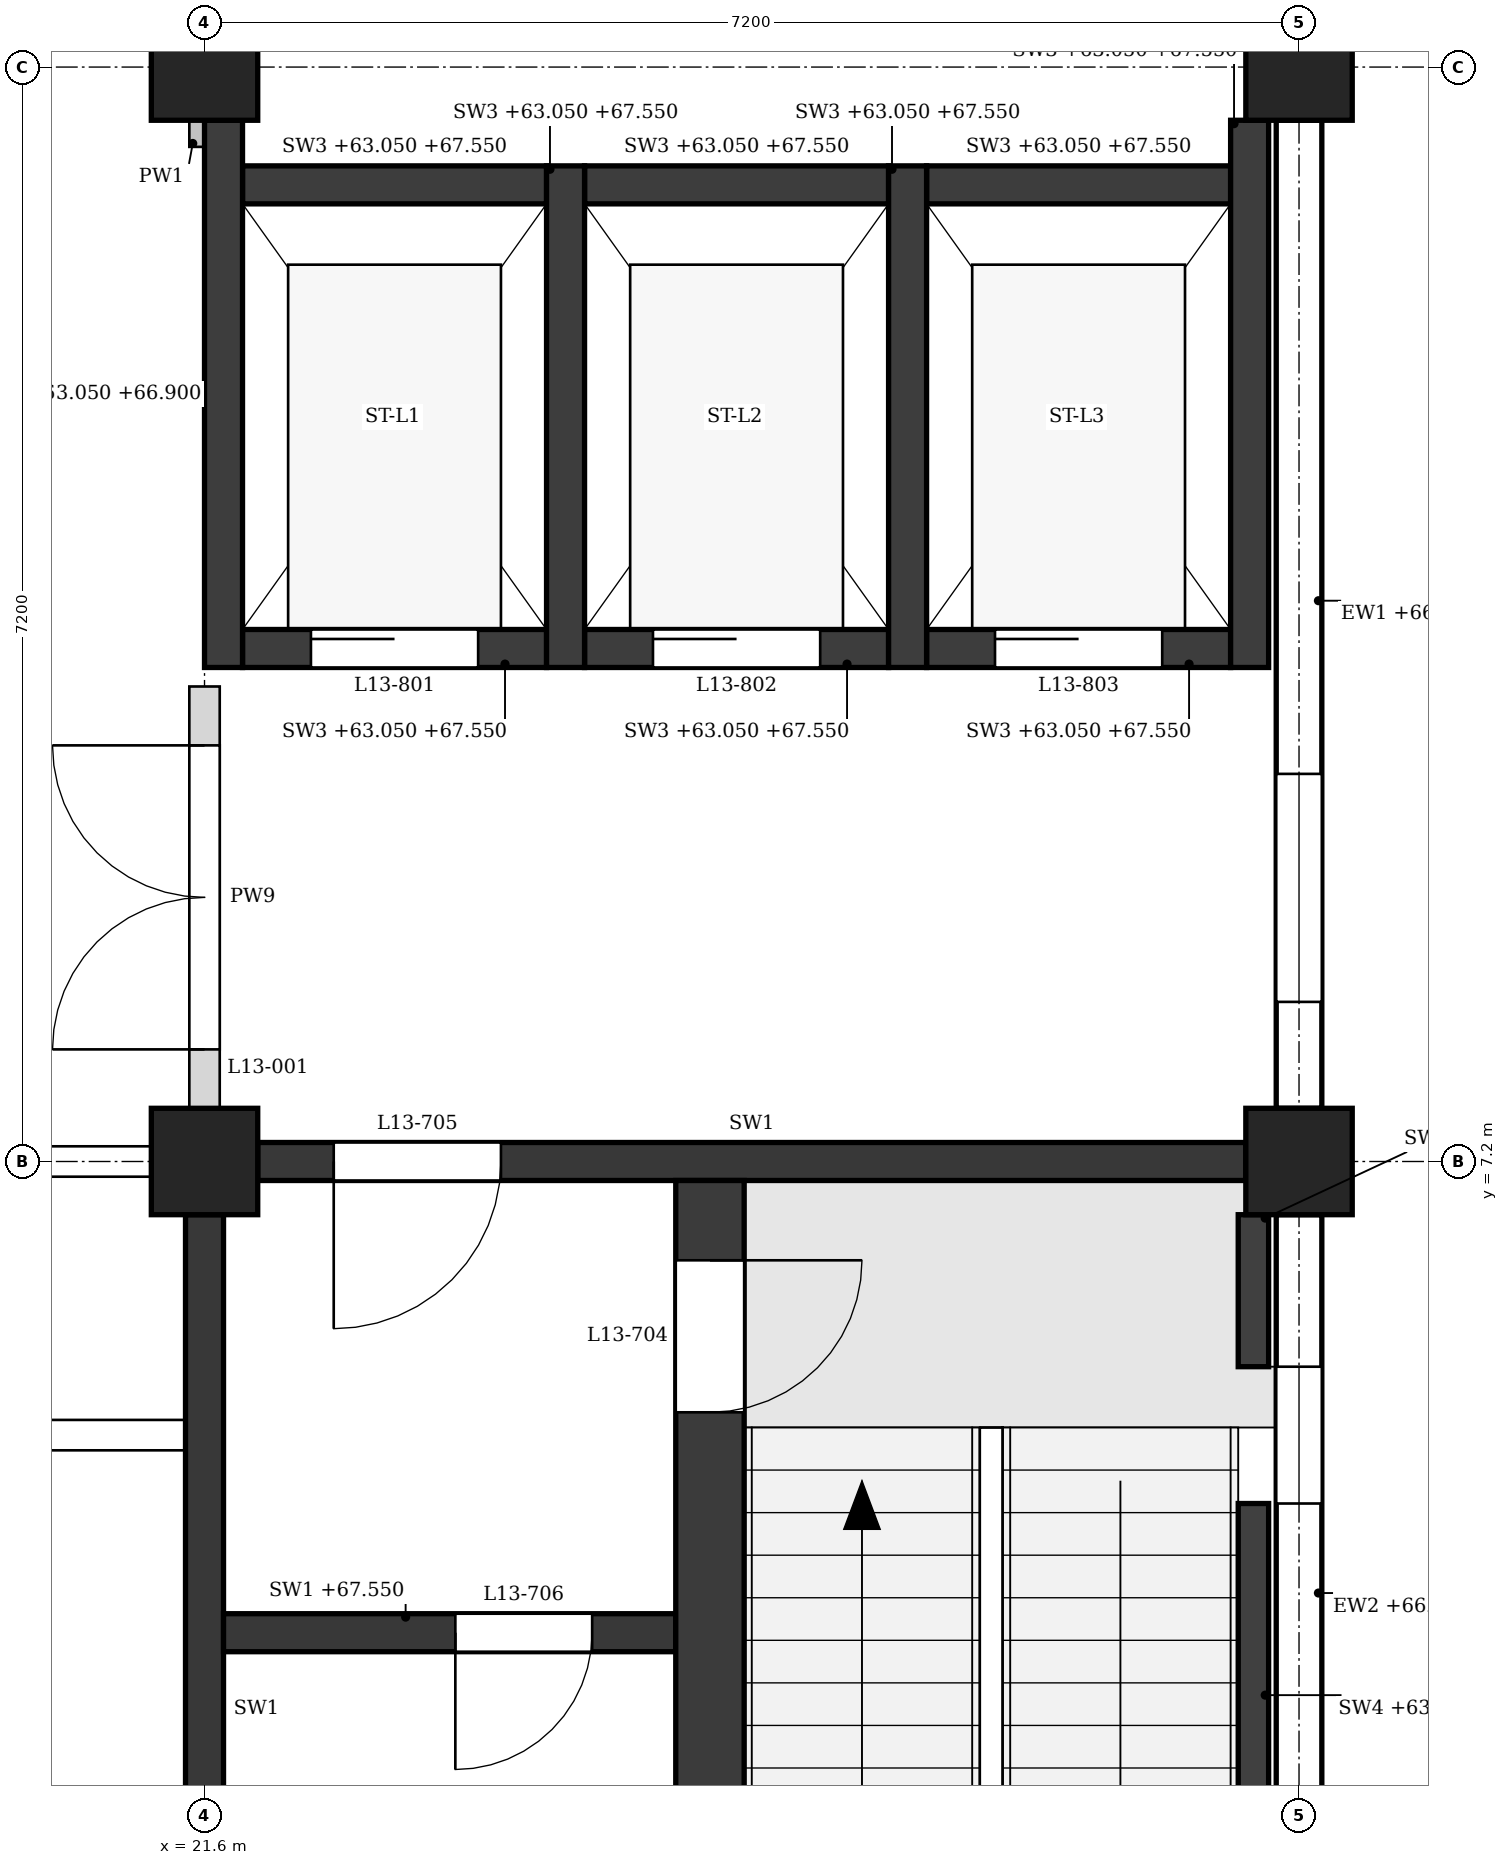
"""IFC4 building model, lengths in metres.
Left out: names, types, materials, properties, quantities, classifications, styles, units other than length and angle.
Written with IfcOpenShell. Run it as: python <this file> out.ifc"""

import sys

from ifc_helpers import new_model, si_unit, direction, frame, frame_2d, origin, origin_2d, place, context, subcontext, project, spatial, polyline, rectangle, outline, extrude, element, fill, save


model = new_model("IFC4")
c1 = context("Model", 3, precision=1e-05, world=origin(), true_north=direction((0.0, 1.0)))
c2 = subcontext(c1, "Body", "Model", "MODEL_VIEW")
j1 = project(units=[si_unit("LENGTHUNIT", "METRE"), si_unit("PLANEANGLEUNIT", "RADIAN")], contexts=[c1])
p1 = place(None, origin())
s1 = spatial("IfcSite", under=j1, at=p1, CompositionType="ELEMENT")
p2 = place(p1, origin())
s2 = spatial("IfcBuilding", under=s1, at=p2, CompositionType="ELEMENT")
p3 = place(p2, frame((0.0, 0.0, 63.3)))
s3 = spatial("IfcBuildingStorey", under=s2, at=p3, CompositionType="ELEMENT", Elevation=63.3)
for number, where, z_axis, x_axis in (
    (1, (21.6, 7.2, 0.0), (0.0, 0.0, 1.0), (1.0, 0.0, 0.0)),
    (2, (21.6, 14.4, 0.0), (0.0, 0.0, 1.0), (1.0, 0.0, 0.0)),
    (3, (28.8, 7.2, 0.0), (0.0, 0.0, 1.0), (1.0, 0.0, 0.0)),
    (4, (28.8, 14.4, 0.0), (0.0, 0.0, 1.0), (1.0, 0.0, 0.0)),
):
    element("IfcColumn", number, at=place(p3, frame(where, z_axis=z_axis, x_axis=x_axis)), inside=s3, PredefinedType="COLUMN", context=c2, shape_type="SweptSolid", body=[
        extrude(rectangle(XDim=0.7, YDim=0.7, at=origin_2d()), origin(), (0.0, 0.0, 1.0), 4.5),
    ])
p4 = place(p3, frame((28.8, 0.35, 0.0), z_axis=(0.0, 0.0, 1.0), x_axis=(0.0, 1.0, 0.0)))
e5 = element("IfcWall", 5, at=p4, inside=s3, PredefinedType="STANDARD", context=c2, shape_type="SweptSolid", body=[
    extrude(rectangle(XDim=6.5, YDim=0.3, at=frame_2d((3.25, 0.0))), origin(), (0.0, 0.0, 1.0), 3.65),
])
p5 = place(p4, frame((1.0, 0.0, 0.9)))
e6 = element("IfcOpeningElement", 6, at=p5, cuts=e5, PredefinedType="OPENING", context=c2, shape_type="SweptSolid", body=[
    extrude(outline(polyline([(0.0, 0.0), (0.9, 0.0), (0.9, 2.25), (0.45, 2.7), (0.0, 2.25), (0.0, 0.0)])), frame((0.0, 0.16, 0.0), z_axis=(0.0, -1.0, 0.0), x_axis=(1.0, 0.0, 0.0)), (0.0, 0.0, 1.0), 0.32),
])
p6 = place(p4, frame((4.6, 0.0, 0.9)))
e7 = element("IfcOpeningElement", 7, at=p6, cuts=e5, PredefinedType="OPENING", context=c2, shape_type="SweptSolid", body=[
    extrude(outline(polyline([(0.0, 0.0), (0.9, 0.0), (0.9, 2.25), (0.45, 2.7), (0.0, 2.25), (0.0, 0.0)])), frame((0.0, 0.16, 0.0), z_axis=(0.0, -1.0, 0.0), x_axis=(1.0, 0.0, 0.0)), (0.0, 0.0, 1.0), 0.32),
])
p7 = place(p3, frame((28.8, 7.55, 0.0), z_axis=(0.0, 0.0, 1.0), x_axis=(0.0, 1.0, 0.0)))
e8 = element("IfcWall", 8, at=p7, inside=s3, PredefinedType="STANDARD", context=c2, shape_type="SweptSolid", body=[
    extrude(rectangle(XDim=6.5, YDim=0.3, at=frame_2d((3.25, 0.0))), origin(), (0.0, 0.0, 1.0), 3.65),
])
p8 = place(p7, frame((0.7, 0.0, 0.9)))
e9 = element("IfcOpeningElement", 9, at=p8, cuts=e8, PredefinedType="OPENING", context=c2, shape_type="SweptSolid", body=[
    extrude(outline(polyline([(0.0, 0.0), (1.5, 0.0), (1.5, 1.95), (0.75, 2.7), (0.0, 1.95), (0.0, 0.0)])), frame((0.0, 0.16, 0.0), z_axis=(0.0, -1.0, 0.0), x_axis=(1.0, 0.0, 0.0)), (0.0, 0.0, 1.0), 0.32),
])
p9 = place(p3, frame((21.95, 7.2, 0.0), z_axis=(0.0, 0.0, 1.0), x_axis=(1.0, 0.0, 0.0)))
e10 = element("IfcWall", 10, at=p9, inside=s3, PredefinedType="SHEAR", context=c2, shape_type="SweptSolid", body=[
    extrude(rectangle(XDim=6.5, YDim=0.25, at=frame_2d((3.25, 0.0))), origin(), (0.0, 0.0, 1.0), 3.6),
])
p10 = place(p9, frame((0.5, 0.0, 0.0)))
e11 = element("IfcOpeningElement", 11, at=p10, cuts=e10, PredefinedType="OPENING", context=c2, shape_type="SweptSolid", body=[
    extrude(rectangle(XDim=1.1, YDim=2.1, at=frame_2d((0.55, 1.05))), frame((0.0, 0.135, 0.0), z_axis=(0.0, -1.0, 0.0), x_axis=(1.0, 0.0, 0.0)), (0.0, 0.0, 1.0), 0.27),
])
p11 = place(p3, frame((21.6, 0.35, 0.0), z_axis=(0.0, 0.0, 1.0), x_axis=(0.0, 1.0, 0.0)))
e12 = element("IfcWall", 12, at=p11, inside=s3, PredefinedType="SHEAR", context=c2, shape_type="SweptSolid", body=[
    extrude(rectangle(XDim=6.5, YDim=0.25, at=frame_2d((3.25, 0.0))), origin(), (0.0, 0.0, 1.0), 3.6),
])
p12 = place(p3, frame((28.5, 2.25, -0.25), z_axis=(0.0, 0.0, 1.0), x_axis=(0.0, 1.0, 0.0)))
e13 = element("IfcWall", 13, at=p12, inside=s3, PredefinedType="SHEAR", context=c2, shape_type="SweptSolid", body=[
    extrude(rectangle(XDim=2.7, YDim=0.2, at=frame_2d((1.35, 0.0))), origin(), (0.0, 0.0, 1.0), 4.5),
])
p13 = place(p3, frame((28.5, 5.85, -0.25), z_axis=(0.0, 0.0, 1.0), x_axis=(0.0, 1.0, 0.0)))
e14 = element("IfcWall", 14, at=p13, inside=s3, PredefinedType="SHEAR", context=c2, shape_type="SweptSolid", body=[
    extrude(rectangle(XDim=1.0, YDim=0.2, at=frame_2d((0.5, 0.0))), origin(), (0.0, 0.0, 1.0), 4.5),
])
p14 = place(p3, frame((24.925, 0.15, 0.0), z_axis=(0.0, 0.0, 1.0), x_axis=(0.0, 1.0, 0.0)))
e15 = element("IfcWall", 15, at=p14, inside=s3, PredefinedType="SHEAR", context=c2, shape_type="SweptSolid", body=[
    extrude(rectangle(XDim=6.925, YDim=0.45, at=frame_2d((3.462, 0.0))), origin(), (0.0, 0.0, 1.0), 4.25),
])
p15 = place(p14, frame((5.4, 0.0, 0.0)))
e16 = element("IfcOpeningElement", 16, at=p15, cuts=e15, PredefinedType="OPENING", context=c2, shape_type="SweptSolid", body=[
    extrude(rectangle(XDim=1.0, YDim=2.1, at=frame_2d((0.5, 1.05))), frame((0.0, 0.235, 0.0), z_axis=(0.0, -1.0, 0.0), x_axis=(1.0, 0.0, 0.0)), (0.0, 0.0, 1.0), 0.47),
])
p16 = place(p3, frame((21.725, 4.1, 0.0), z_axis=(0.0, 0.0, 1.0), x_axis=(1.0, 0.0, 0.0)))
e17 = element("IfcWall", 17, at=p16, inside=s3, PredefinedType="SHEAR", context=c2, shape_type="SweptSolid", body=[
    extrude(rectangle(XDim=2.975, YDim=0.25, at=frame_2d((1.487, 0.0))), origin(), (0.0, 0.0, 1.0), 4.25),
])
p17 = place(p16, frame((1.525, 0.0, 0.0)))
e18 = element("IfcOpeningElement", 18, at=p17, cuts=e17, PredefinedType="OPENING", context=c2, shape_type="SweptSolid", body=[
    extrude(rectangle(XDim=0.9, YDim=2.1, at=frame_2d((0.45, 1.05))), frame((0.0, 0.135, 0.0), z_axis=(0.0, -1.0, 0.0), x_axis=(1.0, 0.0, 0.0)), (0.0, 0.0, 1.0), 0.27),
])
p18 = place(p3, frame((21.725, 10.45, -0.25), z_axis=(0.0, 0.0, 1.0), x_axis=(0.0, 1.0, 0.0)))
e19 = element("IfcWall", 19, at=p18, inside=s3, PredefinedType="SHEAR", context=c2, shape_type="SweptSolid", body=[
    extrude(rectangle(XDim=3.6, YDim=0.25, at=frame_2d((1.8, 0.0))), origin(), (0.0, 0.0, 1.0), 3.85),
])
for number, where, z_axis, x_axis in (
    (20, (23.975, 10.45, -0.25), (0.0, 0.0, 1.0), (0.0, 1.0, 0.0)),
    (21, (26.225, 10.45, -0.25), (0.0, 0.0, 1.0), (0.0, 1.0, 0.0)),
):
    element("IfcWall", number, at=place(p3, frame(where, z_axis=z_axis, x_axis=x_axis)), inside=s3, PredefinedType="SHEAR", context=c2, shape_type="SweptSolid", body=[
        extrude(rectangle(XDim=3.3, YDim=0.25, at=frame_2d((1.65, 0.0))), origin(), (0.0, 0.0, 1.0), 4.5),
    ])
p19 = place(p3, frame((28.475, 10.45, -0.25), z_axis=(0.0, 0.0, 1.0), x_axis=(0.0, 1.0, 0.0)))
e22 = element("IfcWall", 22, at=p19, inside=s3, PredefinedType="SHEAR", context=c2, shape_type="SweptSolid", body=[
    extrude(rectangle(XDim=3.6, YDim=0.25, at=frame_2d((1.8, 0.0))), origin(), (0.0, 0.0, 1.0), 4.5),
])
p20 = place(p3, frame((21.85, 10.575, -0.25), z_axis=(0.0, 0.0, 1.0), x_axis=(1.0, 0.0, 0.0)))
e23 = element("IfcWall", 23, at=p20, inside=s3, PredefinedType="SHEAR", context=c2, shape_type="SweptSolid", body=[
    extrude(rectangle(XDim=2.0, YDim=0.25, at=frame_2d((1.0, 0.0))), origin(), (0.0, 0.0, 1.0), 4.5),
])
p21 = place(p20, frame((0.45, 0.0, 0.25)))
e24 = element("IfcOpeningElement", 24, at=p21, cuts=e23, PredefinedType="OPENING", context=c2, shape_type="SweptSolid", body=[
    extrude(rectangle(XDim=1.1, YDim=2.1, at=frame_2d((0.55, 1.05))), frame((0.0, 0.135, 0.0), z_axis=(0.0, -1.0, 0.0), x_axis=(1.0, 0.0, 0.0)), (0.0, 0.0, 1.0), 0.27),
])
p22 = place(p3, frame((21.85, 13.625, -0.25), z_axis=(0.0, 0.0, 1.0), x_axis=(1.0, 0.0, 0.0)))
e25 = element("IfcWall", 25, at=p22, inside=s3, PredefinedType="SHEAR", context=c2, shape_type="SweptSolid", body=[
    extrude(rectangle(XDim=2.0, YDim=0.25, at=frame_2d((1.0, 0.0))), origin(), (0.0, 0.0, 1.0), 4.5),
])
p23 = place(p3, frame((24.1, 10.575, -0.25), z_axis=(0.0, 0.0, 1.0), x_axis=(1.0, 0.0, 0.0)))
e26 = element("IfcWall", 26, at=p23, inside=s3, PredefinedType="SHEAR", context=c2, shape_type="SweptSolid", body=[
    extrude(rectangle(XDim=2.0, YDim=0.25, at=frame_2d((1.0, 0.0))), origin(), (0.0, 0.0, 1.0), 4.5),
])
p24 = place(p23, frame((0.45, 0.0, 0.25)))
e27 = element("IfcOpeningElement", 27, at=p24, cuts=e26, PredefinedType="OPENING", context=c2, shape_type="SweptSolid", body=[
    extrude(rectangle(XDim=1.1, YDim=2.1, at=frame_2d((0.55, 1.05))), frame((0.0, 0.135, 0.0), z_axis=(0.0, -1.0, 0.0), x_axis=(1.0, 0.0, 0.0)), (0.0, 0.0, 1.0), 0.27),
])
p25 = place(p3, frame((24.1, 13.625, -0.25), z_axis=(0.0, 0.0, 1.0), x_axis=(1.0, 0.0, 0.0)))
e28 = element("IfcWall", 28, at=p25, inside=s3, PredefinedType="SHEAR", context=c2, shape_type="SweptSolid", body=[
    extrude(rectangle(XDim=2.0, YDim=0.25, at=frame_2d((1.0, 0.0))), origin(), (0.0, 0.0, 1.0), 4.5),
])
p26 = place(p3, frame((26.35, 10.575, -0.25), z_axis=(0.0, 0.0, 1.0), x_axis=(1.0, 0.0, 0.0)))
e29 = element("IfcWall", 29, at=p26, inside=s3, PredefinedType="SHEAR", context=c2, shape_type="SweptSolid", body=[
    extrude(rectangle(XDim=2.0, YDim=0.25, at=frame_2d((1.0, 0.0))), origin(), (0.0, 0.0, 1.0), 4.5),
])
p27 = place(p26, frame((0.45, 0.0, 0.25)))
e30 = element("IfcOpeningElement", 30, at=p27, cuts=e29, PredefinedType="OPENING", context=c2, shape_type="SweptSolid", body=[
    extrude(rectangle(XDim=1.1, YDim=2.1, at=frame_2d((0.55, 1.05))), frame((0.0, 0.135, 0.0), z_axis=(0.0, -1.0, 0.0), x_axis=(1.0, 0.0, 0.0)), (0.0, 0.0, 1.0), 0.27),
])
p28 = place(p3, frame((26.35, 13.625, -0.25), z_axis=(0.0, 0.0, 1.0), x_axis=(1.0, 0.0, 0.0)))
e31 = element("IfcWall", 31, at=p28, inside=s3, PredefinedType="SHEAR", context=c2, shape_type="SweptSolid", body=[
    extrude(rectangle(XDim=2.0, YDim=0.25, at=frame_2d((1.0, 0.0))), origin(), (0.0, 0.0, 1.0), 4.5),
])
p29 = place(p3, frame((7.325, 5.4, 0.0), z_axis=(0.0, 0.0, 1.0), x_axis=(1.0, 0.0, 0.0)))
e32 = element("IfcWall", 32, at=p29, inside=s3, PredefinedType="PARTITIONING", context=c2, shape_type="SweptSolid", body=[
    extrude(outline(polyline([(0.0, 0.0), (14.15, 0.0), (14.15, 3.6), (14.075, 3.6), (14.075, 4.25), (7.275, 4.25), (7.275, 3.6), (6.875, 3.6), (6.875, 4.25), (0.075, 4.25), (0.075, 3.6), (0.0, 3.6), (0.0, 0.0)])), frame((0.0, 0.1, 0.0), z_axis=(0.0, -1.0, 0.0), x_axis=(1.0, 0.0, 0.0)), (0.0, 0.0, 1.0), 0.2),
])
p30 = place(p29, frame((1.238, 0.0, 0.0)))
e33 = element("IfcOpeningElement", 33, at=p30, cuts=e32, PredefinedType="OPENING", context=c2, shape_type="SweptSolid", body=[
    extrude(rectangle(XDim=1.0, YDim=2.1, at=frame_2d((0.5, 1.05))), frame((0.0, 0.11, 0.0), z_axis=(0.0, -1.0, 0.0), x_axis=(1.0, 0.0, 0.0)), (0.0, 0.0, 1.0), 0.22),
])
p31 = place(p29, frame((4.775, 0.0, 0.0)))
e34 = element("IfcOpeningElement", 34, at=p31, cuts=e32, PredefinedType="OPENING", context=c2, shape_type="SweptSolid", body=[
    extrude(rectangle(XDim=1.0, YDim=2.1, at=frame_2d((0.5, 1.05))), frame((0.0, 0.11, 0.0), z_axis=(0.0, -1.0, 0.0), x_axis=(1.0, 0.0, 0.0)), (0.0, 0.0, 1.0), 0.22),
])
p32 = place(p29, frame((8.375, 0.0, 0.0)))
e35 = element("IfcOpeningElement", 35, at=p32, cuts=e32, PredefinedType="OPENING", context=c2, shape_type="SweptSolid", body=[
    extrude(rectangle(XDim=1.0, YDim=2.1, at=frame_2d((0.5, 1.05))), frame((0.0, 0.11, 0.0), z_axis=(0.0, -1.0, 0.0), x_axis=(1.0, 0.0, 0.0)), (0.0, 0.0, 1.0), 0.22),
])
p33 = place(p29, frame((11.913, 0.0, 0.0)))
e36 = element("IfcOpeningElement", 36, at=p33, cuts=e32, PredefinedType="OPENING", context=c2, shape_type="SweptSolid", body=[
    extrude(rectangle(XDim=1.0, YDim=2.1, at=frame_2d((0.5, 1.05))), frame((0.0, 0.11, 0.0), z_axis=(0.0, -1.0, 0.0), x_axis=(1.0, 0.0, 0.0)), (0.0, 0.0, 1.0), 0.22),
])
p34 = place(p3, frame((14.75, 7.2, 0.0), z_axis=(0.0, 0.0, 1.0), x_axis=(1.0, 0.0, 0.0)))
e37 = element("IfcWall", 37, at=p34, inside=s3, PredefinedType="PARTITIONING", context=c2, shape_type="SweptSolid", body=[
    extrude(rectangle(XDim=6.5, YDim=0.2, at=frame_2d((3.25, 0.0))), origin(), (0.0, 0.0, 1.0), 3.6),
])
p35 = place(p34, frame((4.375, 0.0, 0.0)))
e38 = element("IfcOpeningElement", 38, at=p35, cuts=e37, PredefinedType="OPENING", context=c2, shape_type="SweptSolid", body=[
    extrude(rectangle(XDim=1.0, YDim=2.1, at=frame_2d((0.5, 1.05))), frame((0.0, 0.11, 0.0), z_axis=(0.0, -1.0, 0.0), x_axis=(1.0, 0.0, 0.0)), (0.0, 0.0, 1.0), 0.22),
])
p36 = place(p3, frame((21.6, 7.55, 0.0), z_axis=(0.0, 0.0, 1.0), x_axis=(0.0, 1.0, 0.0)))
e39 = element("IfcWall", 39, at=p36, inside=s3, PredefinedType="PARTITIONING", context=c2, shape_type="SweptSolid", body=[
    extrude(rectangle(XDim=2.775, YDim=0.2, at=frame_2d((1.387, 0.0))), origin(), (0.0, 0.0, 1.0), 3.6),
])
p37 = place(p36, frame((0.387, 0.0, 0.0)))
e40 = element("IfcOpeningElement", 40, at=p37, cuts=e39, PredefinedType="OPENING", context=c2, shape_type="SweptSolid", body=[
    extrude(rectangle(XDim=2.0, YDim=2.4, at=frame_2d((1.0, 1.2))), frame((0.0, 0.11, 0.0), z_axis=(0.0, -1.0, 0.0), x_axis=(1.0, 0.0, 0.0)), (0.0, 0.0, 1.0), 0.22),
])
p38 = place(p3, frame((21.6, 13.875, 0.0), z_axis=(0.0, 0.0, 1.0), x_axis=(0.0, 1.0, 0.0)))
e41 = element("IfcWall", 41, at=p38, inside=s3, PredefinedType="PARTITIONING", context=c2, shape_type="SweptSolid", body=[
    extrude(rectangle(XDim=0.175, YDim=0.2, at=frame_2d((0.087, 0.0))), origin(), (0.0, 0.0, 1.0), 3.6),
])
p39 = place(p6, origin())
e42 = element("IfcWindow", 42, at=p39, inside=s3, PartitioningType="SINGLE_PANEL", PredefinedType="WINDOW", context=c2, shape_type="SweptSolid", body=[
    extrude(outline(polyline([(0.0, 0.0), (0.9, 0.0), (0.9, 2.25), (0.45, 2.7), (0.0, 2.25), (0.0, 0.0)])), frame((0.0, 0.03, 0.0), z_axis=(0.0, -1.0, 0.0), x_axis=(1.0, 0.0, 0.0)), (0.0, 0.0, 1.0), 0.06),
])
fill(e7, e42)
p40 = place(p8, origin())
e43 = element("IfcWindow", 43, at=p40, inside=s3, PartitioningType="SINGLE_PANEL", PredefinedType="WINDOW", context=c2, shape_type="SweptSolid", body=[
    extrude(outline(polyline([(0.0, 0.0), (1.5, 0.0), (1.5, 1.95), (0.75, 2.7), (0.0, 1.95), (0.0, 0.0)])), frame((0.0, 0.03, 0.0), z_axis=(0.0, -1.0, 0.0), x_axis=(1.0, 0.0, 0.0)), (0.0, 0.0, 1.0), 0.06),
])
fill(e9, e43)
p41 = place(p15, frame((1.0, 0.0, 0.0), z_axis=(0.0, 0.0, 1.0), x_axis=(-1.0, 0.0, 0.0)))
e44 = element("IfcDoor", 44, at=p41, inside=s3, OperationType="SINGLE_SWING_LEFT", PredefinedType="DOOR", context=c2, shape_type="SweptSolid", body=[
    extrude(rectangle(XDim=1.0, YDim=2.1, at=frame_2d((0.5, 1.05))), frame((0.0, 0.025, 0.0), z_axis=(0.0, -1.0, 0.0), x_axis=(1.0, 0.0, 0.0)), (0.0, 0.0, 1.0), 0.05),
])
fill(e16, e44)
p42 = place(p10, frame((1.1, 0.0, 0.0), z_axis=(0.0, 0.0, 1.0), x_axis=(-1.0, 0.0, 0.0)))
e45 = element("IfcDoor", 45, at=p42, inside=s3, OperationType="SINGLE_SWING_RIGHT", PredefinedType="DOOR", context=c2, shape_type="SweptSolid", body=[
    extrude(rectangle(XDim=1.1, YDim=2.1, at=frame_2d((0.55, 1.05))), frame((0.0, 0.025, 0.0), z_axis=(0.0, -1.0, 0.0), x_axis=(1.0, 0.0, 0.0)), (0.0, 0.0, 1.0), 0.05),
])
fill(e11, e45)
p43 = place(p17, frame((0.9, 0.0, 0.0), z_axis=(0.0, 0.0, 1.0), x_axis=(-1.0, 0.0, 0.0)))
e46 = element("IfcDoor", 46, at=p43, inside=s3, OperationType="SINGLE_SWING_RIGHT", PredefinedType="DOOR", context=c2, shape_type="SweptSolid", body=[
    extrude(rectangle(XDim=0.9, YDim=2.1, at=frame_2d((0.45, 1.05))), frame((0.0, 0.025, 0.0), z_axis=(0.0, -1.0, 0.0), x_axis=(1.0, 0.0, 0.0)), (0.0, 0.0, 1.0), 0.05),
])
fill(e18, e46)
p44 = place(p21, origin())
e47 = element("IfcDoor", 47, at=p44, inside=s3, OperationType="SLIDING_TO_LEFT", PredefinedType="DOOR", context=c2, shape_type="SweptSolid", body=[
    extrude(rectangle(XDim=1.1, YDim=2.1, at=frame_2d((0.55, 1.05))), frame((0.0, 0.025, 0.0), z_axis=(0.0, -1.0, 0.0), x_axis=(1.0, 0.0, 0.0)), (0.0, 0.0, 1.0), 0.05),
])
fill(e24, e47)
p45 = place(p24, origin())
e48 = element("IfcDoor", 48, at=p45, inside=s3, OperationType="SLIDING_TO_LEFT", PredefinedType="DOOR", context=c2, shape_type="SweptSolid", body=[
    extrude(rectangle(XDim=1.1, YDim=2.1, at=frame_2d((0.55, 1.05))), frame((0.0, 0.025, 0.0), z_axis=(0.0, -1.0, 0.0), x_axis=(1.0, 0.0, 0.0)), (0.0, 0.0, 1.0), 0.05),
])
fill(e27, e48)
p46 = place(p27, origin())
e49 = element("IfcDoor", 49, at=p46, inside=s3, OperationType="SLIDING_TO_LEFT", PredefinedType="DOOR", context=c2, shape_type="SweptSolid", body=[
    extrude(rectangle(XDim=1.1, YDim=2.1, at=frame_2d((0.55, 1.05))), frame((0.0, 0.025, 0.0), z_axis=(0.0, -1.0, 0.0), x_axis=(1.0, 0.0, 0.0)), (0.0, 0.0, 1.0), 0.05),
])
fill(e30, e49)
p47 = place(p37, origin())
e50 = element("IfcDoor", 50, at=p47, inside=s3, OperationType="DOUBLE_DOOR_SINGLE_SWING", PredefinedType="DOOR", context=c2, shape_type="SweptSolid", body=[
    extrude(rectangle(XDim=2.0, YDim=2.4, at=frame_2d((1.0, 1.2))), frame((0.0, 0.025, 0.0), z_axis=(0.0, -1.0, 0.0), x_axis=(1.0, 0.0, 0.0)), (0.0, 0.0, 1.0), 0.05),
])
fill(e40, e50)
save(model, sys.argv[1])
